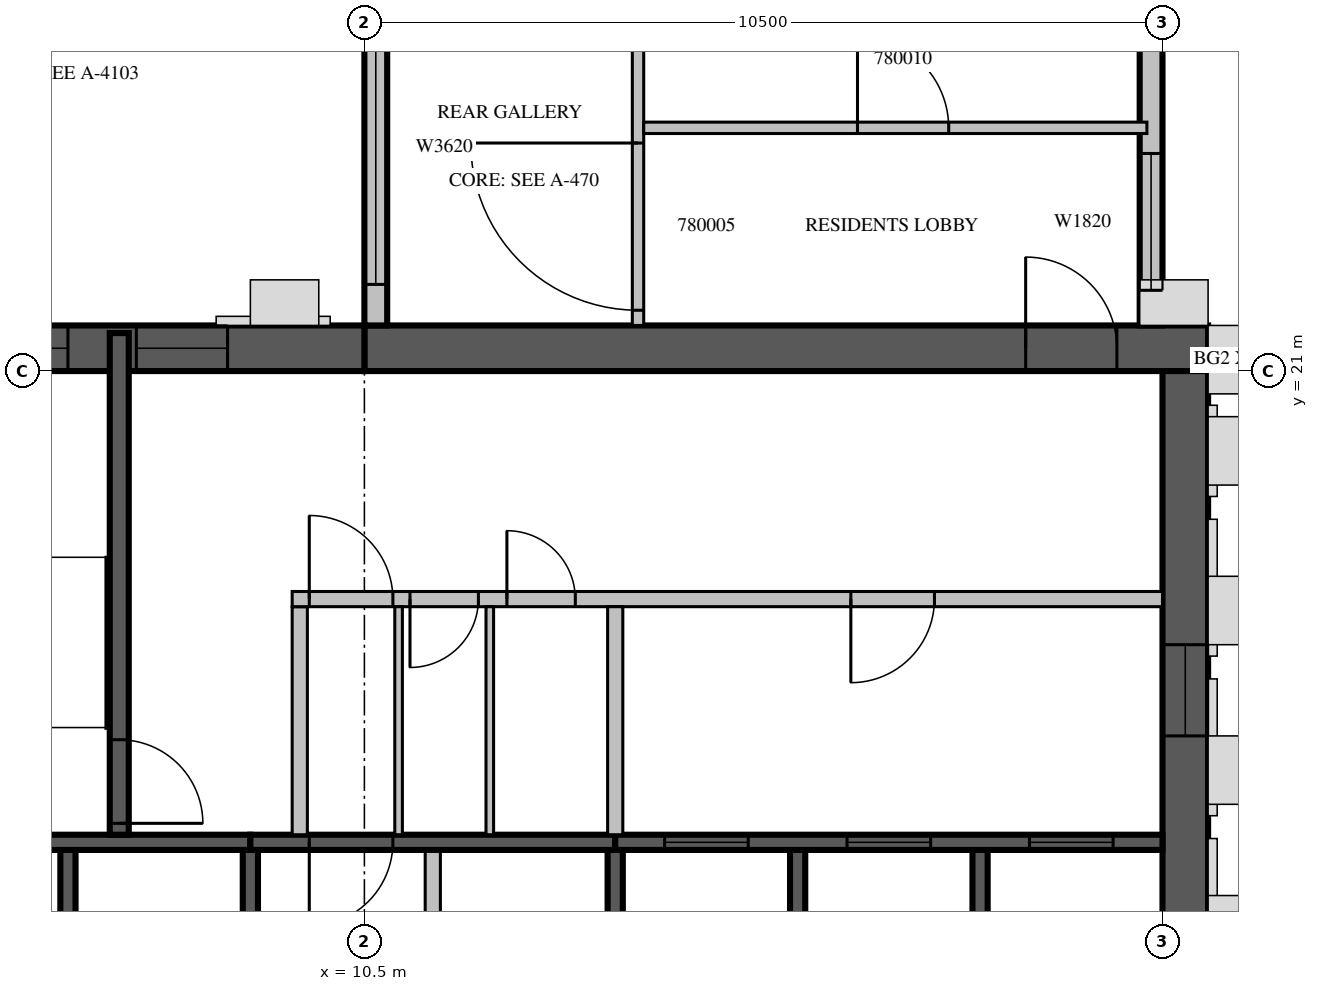
"""IFC4 building model, lengths in metres.
Left out: names, types, materials, properties, quantities, classifications, styles, units other than length and angle.
Written with IfcOpenShell. Run it as: python <this file> out.ifc"""

import sys

from ifc_helpers import new_model, si_unit, direction, frame, frame_2d, origin, place, context, subcontext, project, spatial, rectangle, extrude, source, transform, mapped, element, fill, save


model = new_model("IFC4")
c1 = context("Model", 3, precision=1e-05, world=origin(), true_north=direction((0.0, 1.0)))
c2 = subcontext(c1, "Body", "Model", "MODEL_VIEW")
j1 = project(units=[si_unit("LENGTHUNIT", "METRE"), si_unit("PLANEANGLEUNIT", "RADIAN")], contexts=[c1])
p1 = place(None, origin())
s1 = spatial("IfcSite", under=j1, at=p1, CompositionType="ELEMENT")
p2 = place(p1, origin())
s2 = spatial("IfcBuilding", under=s1, at=p2, CompositionType="ELEMENT")
p3 = place(p2, frame((0.0, 0.0, 340.5)))
s3 = spatial("IfcBuildingStorey", under=s2, at=p3, CompositionType="ELEMENT", Elevation=340.5)
m1 = source(origin(), c2, "Body", "SweptSolid", [
    extrude(rectangle(XDim=11.1, YDim=0.6, at=frame_2d((5.55, 0.0))), origin(), (0.0, 0.0, 1.0), 3.5),
])
p4 = place(p3, frame((10.5, 21.3, 0.0), z_axis=(0.0, 0.0, 1.0), x_axis=(1.0, 0.0, 0.0)))
e1 = element("IfcWall", 1, at=p4, inside=s3, PredefinedType="SHEAR", context=c2, shape_type="MappedRepresentation", body=[
    mapped(m1, transform((0.0, 0.0, 0.0), scale=1.0)),
])
m2 = source(origin(), c2, "Body", "SweptSolid", [
    extrude(rectangle(XDim=1.2, YDim=2.1, at=frame_2d((0.6, 1.05))), frame((0.0, 0.31, 0.0), z_axis=(0.0, -1.0, 0.0), x_axis=(1.0, 0.0, 0.0)), (0.0, 0.0, 1.0), 0.62),
])
p5 = place(p4, frame((8.7, 0.0, 0.0)))
e2 = element("IfcOpeningElement", 2, at=p5, cuts=e1, PredefinedType="OPENING", context=c2, shape_type="MappedRepresentation", body=[
    mapped(m2, transform((0.0, 0.0, 0.0), scale=1.0)),
])
m3 = source(origin(), c2, "Body", "SweptSolid", [
    extrude(rectangle(XDim=16.8, YDim=0.6, at=frame_2d((8.4, 0.0))), origin(), (0.0, 0.0, 1.0), 3.5),
])
p6 = place(p3, frame((21.3, 4.2, 0.0), z_axis=(0.0, 0.0, 1.0), x_axis=(0.0, 1.0, 0.0)))
e3 = element("IfcWall", 3, at=p6, inside=s3, PredefinedType="SHEAR", context=c2, shape_type="MappedRepresentation", body=[
    mapped(m3, transform((0.0, 0.0, 0.0), scale=1.0)),
])
m4 = source(origin(), c2, "Body", "SweptSolid", [
    extrude(rectangle(XDim=1.2, YDim=2.4, at=frame_2d((0.6, 1.2))), frame((0.0, 0.31, 0.0), z_axis=(0.0, -1.0, 0.0), x_axis=(1.0, 0.0, 0.0)), (0.0, 0.0, 1.0), 0.62),
])
p7 = place(p6, frame((12.0, 0.0, 0.6)))
e4 = element("IfcOpeningElement", 4, at=p7, cuts=e3, PredefinedType="OPENING", context=c2, shape_type="MappedRepresentation", body=[
    mapped(m4, transform((0.0, 0.0, 0.0), scale=1.0)),
])
m5 = source(origin(), c2, "Body", "SweptSolid", [
    extrude(rectangle(XDim=6.6, YDim=0.6, at=frame_2d((3.3, 0.0))), origin(), (0.0, 0.0, 1.0), 3.5),
])
p8 = place(p3, frame((3.9, 21.3, 0.0), z_axis=(0.0, 0.0, 1.0), x_axis=(1.0, 0.0, 0.0)))
e5 = element("IfcWall", 5, at=p8, inside=s3, PredefinedType="SHEAR", context=c2, shape_type="MappedRepresentation", body=[
    mapped(m5, transform((0.0, 0.0, 0.0), scale=1.0)),
])
p9 = place(p8, frame((1.5, 0.0, 0.6)))
e6 = element("IfcOpeningElement", 6, at=p9, cuts=e5, PredefinedType="OPENING", context=c2, shape_type="MappedRepresentation", body=[
    mapped(m4, transform((0.0, 0.0, 0.0), scale=1.0)),
])
p10 = place(p8, frame((3.6, 0.0, 0.6)))
e7 = element("IfcOpeningElement", 7, at=p10, cuts=e5, PredefinedType="OPENING", context=c2, shape_type="MappedRepresentation", body=[
    mapped(m4, transform((0.0, 0.0, 0.0), scale=1.0)),
])
m6 = source(origin(), c2, "Body", "SweptSolid", [
    extrude(rectangle(XDim=7.5, YDim=0.3, at=frame_2d((3.75, 0.0))), origin(), (0.0, 0.0, 1.0), 3.1),
])
p11 = place(p3, frame((20.85, 21.6, 0.0), z_axis=(0.0, 0.0, 1.0), x_axis=(0.0, 1.0, 0.0)))
e8 = element("IfcWall", 8, at=p11, inside=s3, PredefinedType="STANDARD", context=c2, shape_type="MappedRepresentation", body=[
    mapped(m6, transform((0.0, 0.0, 0.0), scale=1.0)),
])
m7 = source(origin(), c2, "Body", "SweptSolid", [
    extrude(rectangle(XDim=1.8, YDim=2.0, at=frame_2d((0.9, 1.0))), frame((0.0, 0.16, 0.0), z_axis=(0.0, -1.0, 0.0), x_axis=(1.0, 0.0, 0.0)), (0.0, 0.0, 1.0), 0.32),
])
p12 = place(p11, frame((0.463, 0.0, 0.6)))
e9 = element("IfcOpeningElement", 9, at=p12, cuts=e8, PredefinedType="OPENING", context=c2, shape_type="MappedRepresentation", body=[
    mapped(m7, transform((0.0, 0.0, 0.0), scale=1.0)),
])
m8 = source(origin(), c2, "Body", "SweptSolid", [
    extrude(rectangle(XDim=3.0, YDim=2.0, at=frame_2d((1.5, 1.0))), frame((0.0, 0.16, 0.0), z_axis=(0.0, -1.0, 0.0), x_axis=(1.0, 0.0, 0.0)), (0.0, 0.0, 1.0), 0.32),
])
p13 = place(p11, frame((4.2, 0.0, 0.6)))
e10 = element("IfcOpeningElement", 10, at=p13, cuts=e8, PredefinedType="OPENING", context=c2, shape_type="MappedRepresentation", body=[
    mapped(m8, transform((0.0, 0.0, 0.0), scale=1.0)),
])
m9 = source(origin(), c2, "Body", "SweptSolid", [
    extrude(rectangle(XDim=5.28, YDim=0.3, at=frame_2d((2.64, 0.0))), origin(), (0.0, 0.0, 1.0), 3.1),
])
p14 = place(p3, frame((10.65, 26.88, 0.0), z_axis=(0.0, 0.0, 1.0), x_axis=(0.0, -1.0, 0.0)))
e11 = element("IfcWall", 11, at=p14, inside=s3, PredefinedType="STANDARD", context=c2, shape_type="MappedRepresentation", body=[
    mapped(m9, transform((0.0, 0.0, 0.0), scale=1.0)),
])
m10 = source(origin(), c2, "Body", "SweptSolid", [
    extrude(rectangle(XDim=3.6, YDim=2.0, at=frame_2d((1.8, 1.0))), frame((0.0, 0.16, 0.0), z_axis=(0.0, -1.0, 0.0), x_axis=(1.0, 0.0, 0.0)), (0.0, 0.0, 1.0), 0.32),
])
p15 = place(p14, frame((1.14, 0.0, 0.6)))
e12 = element("IfcOpeningElement", 12, at=p15, cuts=e11, PredefinedType="OPENING", context=c2, shape_type="MappedRepresentation", body=[
    mapped(m10, transform((0.0, 0.0, 0.0), scale=1.0)),
])
m11 = source(origin(), c2, "Body", "SweptSolid", [
    extrude(rectangle(XDim=3.0, YDim=0.2, at=frame_2d((1.5, 0.0))), origin(), (0.0, 0.0, 1.0), 3.5),
])
p16 = place(p3, frame((6.6, 11.7, 0.0), z_axis=(0.0, 0.0, 1.0), x_axis=(0.0, 1.0, 0.0)))
e13 = element("IfcWall", 13, at=p16, inside=s3, PredefinedType="SOLIDWALL", context=c2, shape_type="MappedRepresentation", body=[
    mapped(m11, transform((0.0, 0.0, 0.0), scale=1.0)),
])
m12 = source(origin(), c2, "Body", "SweptSolid", [
    extrude(rectangle(XDim=3.0, YDim=0.2, at=frame_2d((1.5, 0.0))), origin(), (0.0, 0.0, 1.0), 3.1),
])
for number, where, z_axis, x_axis in (
    (14, (9.0, 11.7, 0.0), (0.0, 0.0, 1.0), (0.0, 1.0, 0.0)),
    (15, (13.8, 11.7, 0.0), (0.0, 0.0, 1.0), (0.0, 1.0, 0.0)),
):
    element("IfcWall", number, at=place(p3, frame(where, z_axis=z_axis, x_axis=x_axis)), inside=s3, PredefinedType="SOLIDWALL", context=c2, shape_type="MappedRepresentation", body=[
        mapped(m12, transform((0.0, 0.0, 0.0), scale=1.0)),
    ])
for number, where, z_axis, x_axis in (
    (16, (16.2, 11.7, 0.0), (0.0, 0.0, 1.0), (0.0, 1.0, 0.0)),
    (17, (18.6, 11.7, 0.0), (0.0, 0.0, 1.0), (0.0, 1.0, 0.0)),
):
    element("IfcWall", number, at=place(p3, frame(where, z_axis=z_axis, x_axis=x_axis)), inside=s3, PredefinedType="SOLIDWALL", context=c2, shape_type="MappedRepresentation", body=[
        mapped(m11, transform((0.0, 0.0, 0.0), scale=1.0)),
    ])
m13 = source(origin(), c2, "Body", "SweptSolid", [
    extrude(rectangle(XDim=3.0, YDim=0.2, at=frame_2d((1.5, 0.0))), origin(), (0.0, 0.0, 1.0), 3.1),
])
p17 = place(p3, frame((11.4, 11.7, 0.0), z_axis=(0.0, 0.0, 1.0), x_axis=(0.0, 1.0, 0.0)))
e18 = element("IfcWall", 18, at=p17, inside=s3, PredefinedType="PARTITIONING", context=c2, shape_type="MappedRepresentation", body=[
    mapped(m13, transform((0.0, 0.0, 0.0), scale=1.0)),
])
m14 = source(origin(), c2, "Body", "SweptSolid", [
    extrude(rectangle(XDim=4.8, YDim=0.2, at=frame_2d((2.4, 0.0))), origin(), (0.0, 0.0, 1.0), 3.5),
])
p18 = place(p3, frame((4.2, 14.8, 0.0), z_axis=(0.0, 0.0, 1.0), x_axis=(1.0, 0.0, 0.0)))
e19 = element("IfcWall", 19, at=p18, inside=s3, PredefinedType="SOLIDWALL", context=c2, shape_type="MappedRepresentation", body=[
    mapped(m14, transform((0.0, 0.0, 0.0), scale=1.0)),
])
m15 = source(origin(), c2, "Body", "SweptSolid", [
    extrude(rectangle(XDim=4.8, YDim=0.2, at=frame_2d((2.4, 0.0))), origin(), (0.0, 0.0, 1.0), 3.1),
])
p19 = place(p3, frame((9.0, 14.8, 0.0), z_axis=(0.0, 0.0, 1.0), x_axis=(1.0, 0.0, 0.0)))
e20 = element("IfcWall", 20, at=p19, inside=s3, PredefinedType="SOLIDWALL", context=c2, shape_type="MappedRepresentation", body=[
    mapped(m15, transform((0.0, 0.0, 0.0), scale=1.0)),
])
m16 = source(origin(), c2, "Body", "SweptSolid", [
    extrude(rectangle(XDim=1.1, YDim=2.1, at=frame_2d((0.55, 1.05))), frame((0.0, 0.11, 0.0), z_axis=(0.0, -1.0, 0.0), x_axis=(1.0, 0.0, 0.0)), (0.0, 0.0, 1.0), 0.22),
])
p20 = place(p19, frame((0.775, 0.0, 0.0)))
e21 = element("IfcOpeningElement", 21, at=p20, cuts=e20, PredefinedType="OPENING", context=c2, shape_type="MappedRepresentation", body=[
    mapped(m16, transform((0.0, 0.0, 0.0), scale=1.0)),
])
m17 = source(origin(), c2, "Body", "SweptSolid", [
    extrude(rectangle(XDim=7.2, YDim=0.2, at=frame_2d((3.6, 0.0))), origin(), (0.0, 0.0, 1.0), 3.5),
])
p21 = place(p3, frame((13.8, 14.8, 0.0), z_axis=(0.0, 0.0, 1.0), x_axis=(1.0, 0.0, 0.0)))
e22 = element("IfcWall", 22, at=p21, inside=s3, PredefinedType="SOLIDWALL", context=c2, shape_type="MappedRepresentation", body=[
    mapped(m17, transform((0.0, 0.0, 0.0), scale=1.0)),
])
p22 = place(p21, frame((0.65, 0.0, 0.0)))
e23 = element("IfcOpeningElement", 23, at=p22, cuts=e22, PredefinedType="OPENING", context=c2, shape_type="MappedRepresentation", body=[
    mapped(m16, transform((0.0, 0.0, 0.0), scale=1.0)),
])
p23 = place(p21, frame((3.05, 0.0, 0.0)))
e24 = element("IfcOpeningElement", 24, at=p23, cuts=e22, PredefinedType="OPENING", context=c2, shape_type="MappedRepresentation", body=[
    mapped(m16, transform((0.0, 0.0, 0.0), scale=1.0)),
])
p24 = place(p21, frame((5.45, 0.0, 0.0)))
e25 = element("IfcOpeningElement", 25, at=p24, cuts=e22, PredefinedType="OPENING", context=c2, shape_type="MappedRepresentation", body=[
    mapped(m16, transform((0.0, 0.0, 0.0), scale=1.0)),
])
m18 = source(origin(), c2, "Body", "SweptSolid", [
    extrude(rectangle(XDim=6.6, YDim=0.25, at=frame_2d((3.3, 0.0))), origin(), (0.0, 0.0, 1.0), 3.1),
])
p25 = place(p3, frame((7.275, 14.9, 0.0), z_axis=(0.0, 0.0, 1.0), x_axis=(0.0, 1.0, 0.0)))
e26 = element("IfcWall", 26, at=p25, inside=s3, PredefinedType="SOLIDWALL", context=c2, shape_type="MappedRepresentation", body=[
    mapped(m18, transform((0.0, 0.0, 0.0), scale=1.0)),
])
m19 = source(origin(), c2, "Body", "SweptSolid", [
    extrude(rectangle(XDim=1.1, YDim=2.1, at=frame_2d((0.55, 1.05))), frame((0.0, 0.135, 0.0), z_axis=(0.0, -1.0, 0.0), x_axis=(1.0, 0.0, 0.0)), (0.0, 0.0, 1.0), 0.27),
])
p26 = place(p25, frame((0.15, 0.0, 0.0)))
e27 = element("IfcOpeningElement", 27, at=p26, cuts=e26, PredefinedType="OPENING", context=c2, shape_type="MappedRepresentation", body=[
    mapped(m19, transform((0.0, 0.0, 0.0), scale=1.0)),
])
p27 = place(p3, frame((9.65, 14.9, 0.0), z_axis=(0.0, 0.0, 1.0), x_axis=(0.0, 1.0, 0.0)))
e28 = element("IfcWall", 28, at=p27, inside=s3, PredefinedType="PARTITIONING", context=c2, shape_type="MappedRepresentation", body=[
    mapped(m13, transform((0.0, 0.0, 0.0), scale=1.0)),
])
m20 = source(origin(), c2, "Body", "SweptSolid", [
    extrude(rectangle(XDim=11.45, YDim=0.2, at=frame_2d((5.725, 0.0))), origin(), (0.0, 0.0, 1.0), 3.1),
])
p28 = place(p3, frame((9.55, 18.0, 0.0), z_axis=(0.0, 0.0, 1.0), x_axis=(1.0, 0.0, 0.0)))
e29 = element("IfcWall", 29, at=p28, inside=s3, PredefinedType="PARTITIONING", context=c2, shape_type="MappedRepresentation", body=[
    mapped(m20, transform((0.0, 0.0, 0.0), scale=1.0)),
])
p29 = place(p28, frame((0.225, 0.0, 0.0)))
e30 = element("IfcOpeningElement", 30, at=p29, cuts=e29, PredefinedType="OPENING", context=c2, shape_type="MappedRepresentation", body=[
    mapped(m16, transform((0.0, 0.0, 0.0), scale=1.0)),
])
m21 = source(origin(), c2, "Body", "SweptSolid", [
    extrude(rectangle(XDim=0.9, YDim=2.1, at=frame_2d((0.45, 1.05))), frame((0.0, 0.11, 0.0), z_axis=(0.0, -1.0, 0.0), x_axis=(1.0, 0.0, 0.0)), (0.0, 0.0, 1.0), 0.22),
])
p30 = place(p28, frame((1.55, 0.0, 0.0)))
e31 = element("IfcOpeningElement", 31, at=p30, cuts=e29, PredefinedType="OPENING", context=c2, shape_type="MappedRepresentation", body=[
    mapped(m21, transform((0.0, 0.0, 0.0), scale=1.0)),
])
p31 = place(p28, frame((2.825, 0.0, 0.0)))
e32 = element("IfcOpeningElement", 32, at=p31, cuts=e29, PredefinedType="OPENING", context=c2, shape_type="MappedRepresentation", body=[
    mapped(m21, transform((0.0, 0.0, 0.0), scale=1.0)),
])
p32 = place(p28, frame((7.35, 0.0, 0.0)))
e33 = element("IfcOpeningElement", 33, at=p32, cuts=e29, PredefinedType="OPENING", context=c2, shape_type="MappedRepresentation", body=[
    mapped(m16, transform((0.0, 0.0, 0.0), scale=1.0)),
])
p33 = place(p3, frame((13.8, 14.9, 0.0), z_axis=(0.0, 0.0, 1.0), x_axis=(0.0, 1.0, 0.0)))
e34 = element("IfcWall", 34, at=p33, inside=s3, PredefinedType="PARTITIONING", context=c2, shape_type="MappedRepresentation", body=[
    mapped(m13, transform((0.0, 0.0, 0.0), scale=1.0)),
])
m22 = source(origin(), c2, "Body", "SweptSolid", [
    extrude(rectangle(XDim=3.0, YDim=0.1, at=frame_2d((1.5, 0.0))), origin(), (0.0, 0.0, 1.0), 3.1),
])
for number, where, z_axis, x_axis in (
    (35, (10.95, 14.9, 0.0), (0.0, 0.0, 1.0), (0.0, 1.0, 0.0)),
    (36, (12.15, 14.9, 0.0), (0.0, 0.0, 1.0), (0.0, 1.0, 0.0)),
):
    element("IfcWall", number, at=place(p3, frame(where, z_axis=z_axis, x_axis=x_axis)), inside=s3, PredefinedType="PARTITIONING", context=c2, shape_type="MappedRepresentation", body=[
        mapped(m22, transform((0.0, 0.0, 0.0), scale=1.0)),
    ])
m23 = source(origin(), c2, "Body", "SweptSolid", [
    extrude(rectangle(XDim=7.725, YDim=0.15, at=frame_2d((3.862, 0.0))), origin(), (0.0, 0.0, 1.0), 3.1),
])
p34 = place(p3, frame((14.1, 29.325, 0.0), z_axis=(0.0, 0.0, 1.0), x_axis=(0.0, -1.0, 0.0)))
e37 = element("IfcWall", 37, at=p34, inside=s3, PredefinedType="PARTITIONING", context=c2, shape_type="MappedRepresentation", body=[
    mapped(m23, transform((0.0, 0.0, 0.0), scale=1.0)),
])
m24 = source(origin(), c2, "Body", "SweptSolid", [
    extrude(rectangle(XDim=2.2, YDim=2.1, at=frame_2d((1.1, 1.05))), frame((0.0, 0.085, 0.0), z_axis=(0.0, -1.0, 0.0), x_axis=(1.0, 0.0, 0.0)), (0.0, 0.0, 1.0), 0.17),
])
p35 = place(p34, frame((5.325, 0.0, 0.0)))
e38 = element("IfcOpeningElement", 38, at=p35, cuts=e37, PredefinedType="OPENING", context=c2, shape_type="MappedRepresentation", body=[
    mapped(m24, transform((0.0, 0.0, 0.0), scale=1.0)),
])
m25 = source(origin(), c2, "Body", "SweptSolid", [
    extrude(rectangle(XDim=6.62, YDim=0.15, at=frame_2d((3.31, 0.0))), origin(), (0.0, 0.0, 1.0), 3.1),
])
p36 = place(p3, frame((14.175, 24.2, 0.0), z_axis=(0.0, 0.0, 1.0), x_axis=(1.0, 0.0, 0.0)))
e39 = element("IfcWall", 39, at=p36, inside=s3, PredefinedType="PARTITIONING", context=c2, shape_type="MappedRepresentation", body=[
    mapped(m25, transform((0.0, 0.0, 0.0), scale=1.0)),
])
m26 = source(origin(), c2, "Body", "SweptSolid", [
    extrude(rectangle(XDim=1.2, YDim=2.1, at=frame_2d((0.6, 1.05))), frame((0.0, 0.085, 0.0), z_axis=(0.0, -1.0, 0.0), x_axis=(1.0, 0.0, 0.0)), (0.0, 0.0, 1.0), 0.17),
])
p37 = place(p36, frame((2.812, 0.0, 0.0)))
e40 = element("IfcOpeningElement", 40, at=p37, cuts=e39, PredefinedType="OPENING", context=c2, shape_type="MappedRepresentation", body=[
    mapped(m26, transform((0.0, 0.0, 0.0), scale=1.0)),
])
m27 = source(origin(), c2, "Body", "SweptSolid", [
    extrude(rectangle(XDim=1.8, YDim=2.0, at=frame_2d((0.9, 1.0))), frame((0.0, 0.03, 0.0), z_axis=(0.0, -1.0, 0.0), x_axis=(1.0, 0.0, 0.0)), (0.0, 0.0, 1.0), 0.06),
])
p38 = place(p12, origin())
e41 = element("IfcWindow", 41, at=p38, inside=s3, PartitioningType="SINGLE_PANEL", PredefinedType="WINDOW", context=c2, shape_type="MappedRepresentation", body=[
    mapped(m27, transform((0.0, 0.0, 0.0), scale=1.0)),
])
fill(e9, e41)
m28 = source(origin(), c2, "Body", "SweptSolid", [
    extrude(rectangle(XDim=3.6, YDim=2.0, at=frame_2d((1.8, 1.0))), frame((0.0, 0.03, 0.0), z_axis=(0.0, -1.0, 0.0), x_axis=(1.0, 0.0, 0.0)), (0.0, 0.0, 1.0), 0.06),
])
p39 = place(p15, origin())
e42 = element("IfcWindow", 42, at=p39, inside=s3, PartitioningType="SINGLE_PANEL", PredefinedType="WINDOW", context=c2, shape_type="MappedRepresentation", body=[
    mapped(m28, transform((0.0, 0.0, 0.0), scale=1.0)),
])
fill(e12, e42)
m29 = source(origin(), c2, "Body", "SweptSolid", [
    extrude(rectangle(XDim=1.1, YDim=2.1, at=frame_2d((0.55, 1.05))), frame((0.0, 0.025, 0.0), z_axis=(0.0, -1.0, 0.0), x_axis=(1.0, 0.0, 0.0)), (0.0, 0.0, 1.0), 0.05),
])
p40 = place(p20, origin())
e43 = element("IfcDoor", 43, at=p40, inside=s3, OperationType="SINGLE_SWING_RIGHT", PredefinedType="DOOR", context=c2, shape_type="MappedRepresentation", body=[
    mapped(m29, transform((0.0, 0.0, 0.0), scale=1.0)),
])
fill(e21, e43)
p41 = place(p22, origin())
e44 = element("IfcDoor", 44, at=p41, inside=s3, OperationType="SLIDING_TO_LEFT", PredefinedType="DOOR", context=c2, shape_type="MappedRepresentation", body=[
    mapped(m29, transform((0.0, 0.0, 0.0), scale=1.0)),
])
fill(e23, e44)
p42 = place(p23, origin())
e45 = element("IfcDoor", 45, at=p42, inside=s3, OperationType="SLIDING_TO_LEFT", PredefinedType="DOOR", context=c2, shape_type="MappedRepresentation", body=[
    mapped(m29, transform((0.0, 0.0, 0.0), scale=1.0)),
])
fill(e24, e45)
p43 = place(p24, origin())
e46 = element("IfcDoor", 46, at=p43, inside=s3, OperationType="SLIDING_TO_LEFT", PredefinedType="DOOR", context=c2, shape_type="MappedRepresentation", body=[
    mapped(m29, transform((0.0, 0.0, 0.0), scale=1.0)),
])
fill(e25, e46)
p44 = place(p26, origin())
e47 = element("IfcDoor", 47, at=p44, inside=s3, OperationType="SINGLE_SWING_RIGHT", PredefinedType="DOOR", context=c2, shape_type="MappedRepresentation", body=[
    mapped(m29, transform((0.0, 0.0, 0.0), scale=1.0)),
])
fill(e27, e47)
p45 = place(p29, origin())
e48 = element("IfcDoor", 48, at=p45, inside=s3, OperationType="SINGLE_SWING_LEFT", PredefinedType="DOOR", context=c2, shape_type="MappedRepresentation", body=[
    mapped(m29, transform((0.0, 0.0, 0.0), scale=1.0)),
])
fill(e30, e48)
m30 = source(origin(), c2, "Body", "SweptSolid", [
    extrude(rectangle(XDim=0.9, YDim=2.1, at=frame_2d((0.45, 1.05))), frame((0.0, 0.025, 0.0), z_axis=(0.0, -1.0, 0.0), x_axis=(1.0, 0.0, 0.0)), (0.0, 0.0, 1.0), 0.05),
])
p46 = place(p30, origin())
e49 = element("IfcDoor", 49, at=p46, inside=s3, OperationType="SINGLE_SWING_RIGHT", PredefinedType="DOOR", context=c2, shape_type="MappedRepresentation", body=[
    mapped(m30, transform((0.0, 0.0, 0.0), scale=1.0)),
])
fill(e31, e49)
p47 = place(p31, origin())
e50 = element("IfcDoor", 50, at=p47, inside=s3, OperationType="SINGLE_SWING_LEFT", PredefinedType="DOOR", context=c2, shape_type="MappedRepresentation", body=[
    mapped(m30, transform((0.0, 0.0, 0.0), scale=1.0)),
])
fill(e32, e50)
p48 = place(p32, origin())
e51 = element("IfcDoor", 51, at=p48, inside=s3, OperationType="SINGLE_SWING_RIGHT", PredefinedType="DOOR", context=c2, shape_type="MappedRepresentation", body=[
    mapped(m29, transform((0.0, 0.0, 0.0), scale=1.0)),
])
fill(e33, e51)
m31 = source(origin(), c2, "Body", "SweptSolid", [
    extrude(rectangle(XDim=1.2, YDim=2.1, at=frame_2d((0.6, 1.05))), frame((0.0, 0.025, 0.0), z_axis=(0.0, -1.0, 0.0), x_axis=(1.0, 0.0, 0.0)), (0.0, 0.0, 1.0), 0.05),
])
p49 = place(p5, origin())
e52 = element("IfcDoor", 52, at=p49, inside=s3, OperationType="SINGLE_SWING_LEFT", PredefinedType="DOOR", context=c2, shape_type="MappedRepresentation", body=[
    mapped(m31, transform((0.0, 0.0, 0.0), scale=1.0)),
])
fill(e2, e52)
m32 = source(origin(), c2, "Body", "SweptSolid", [
    extrude(rectangle(XDim=1.2, YDim=2.4, at=frame_2d((0.6, 1.2))), frame((0.0, 0.03, 0.0), z_axis=(0.0, -1.0, 0.0), x_axis=(1.0, 0.0, 0.0)), (0.0, 0.0, 1.0), 0.06),
])
p50 = place(p7, origin())
e53 = element("IfcWindow", 53, at=p50, inside=s3, PartitioningType="SINGLE_PANEL", PredefinedType="WINDOW", context=c2, shape_type="MappedRepresentation", body=[
    mapped(m32, transform((0.0, 0.0, 0.0), scale=1.0)),
])
fill(e4, e53)
p51 = place(p9, origin())
e54 = element("IfcWindow", 54, at=p51, inside=s3, PartitioningType="SINGLE_PANEL", PredefinedType="WINDOW", context=c2, shape_type="MappedRepresentation", body=[
    mapped(m32, transform((0.0, 0.0, 0.0), scale=1.0)),
])
fill(e6, e54)
p52 = place(p10, origin())
e55 = element("IfcWindow", 55, at=p52, inside=s3, PartitioningType="SINGLE_PANEL", PredefinedType="WINDOW", context=c2, shape_type="MappedRepresentation", body=[
    mapped(m32, transform((0.0, 0.0, 0.0), scale=1.0)),
])
fill(e7, e55)
m33 = source(origin(), c2, "Body", "SweptSolid", [
    extrude(rectangle(XDim=2.2, YDim=2.1, at=frame_2d((1.1, 1.05))), frame((0.0, 0.025, 0.0), z_axis=(0.0, -1.0, 0.0), x_axis=(1.0, 0.0, 0.0)), (0.0, 0.0, 1.0), 0.05),
])
p53 = place(p35, origin())
e56 = element("IfcDoor", 56, at=p53, inside=s3, OperationType="DOUBLE_DOOR_SINGLE_SWING", PredefinedType="DOOR", context=c2, shape_type="MappedRepresentation", body=[
    mapped(m33, transform((0.0, 0.0, 0.0), scale=1.0)),
])
fill(e38, e56)
p54 = place(p37, origin())
e57 = element("IfcDoor", 57, at=p54, inside=s3, OperationType="SINGLE_SWING_LEFT", PredefinedType="DOOR", context=c2, shape_type="MappedRepresentation", body=[
    mapped(m31, transform((0.0, 0.0, 0.0), scale=1.0)),
])
fill(e40, e57)
save(model, sys.argv[1])
